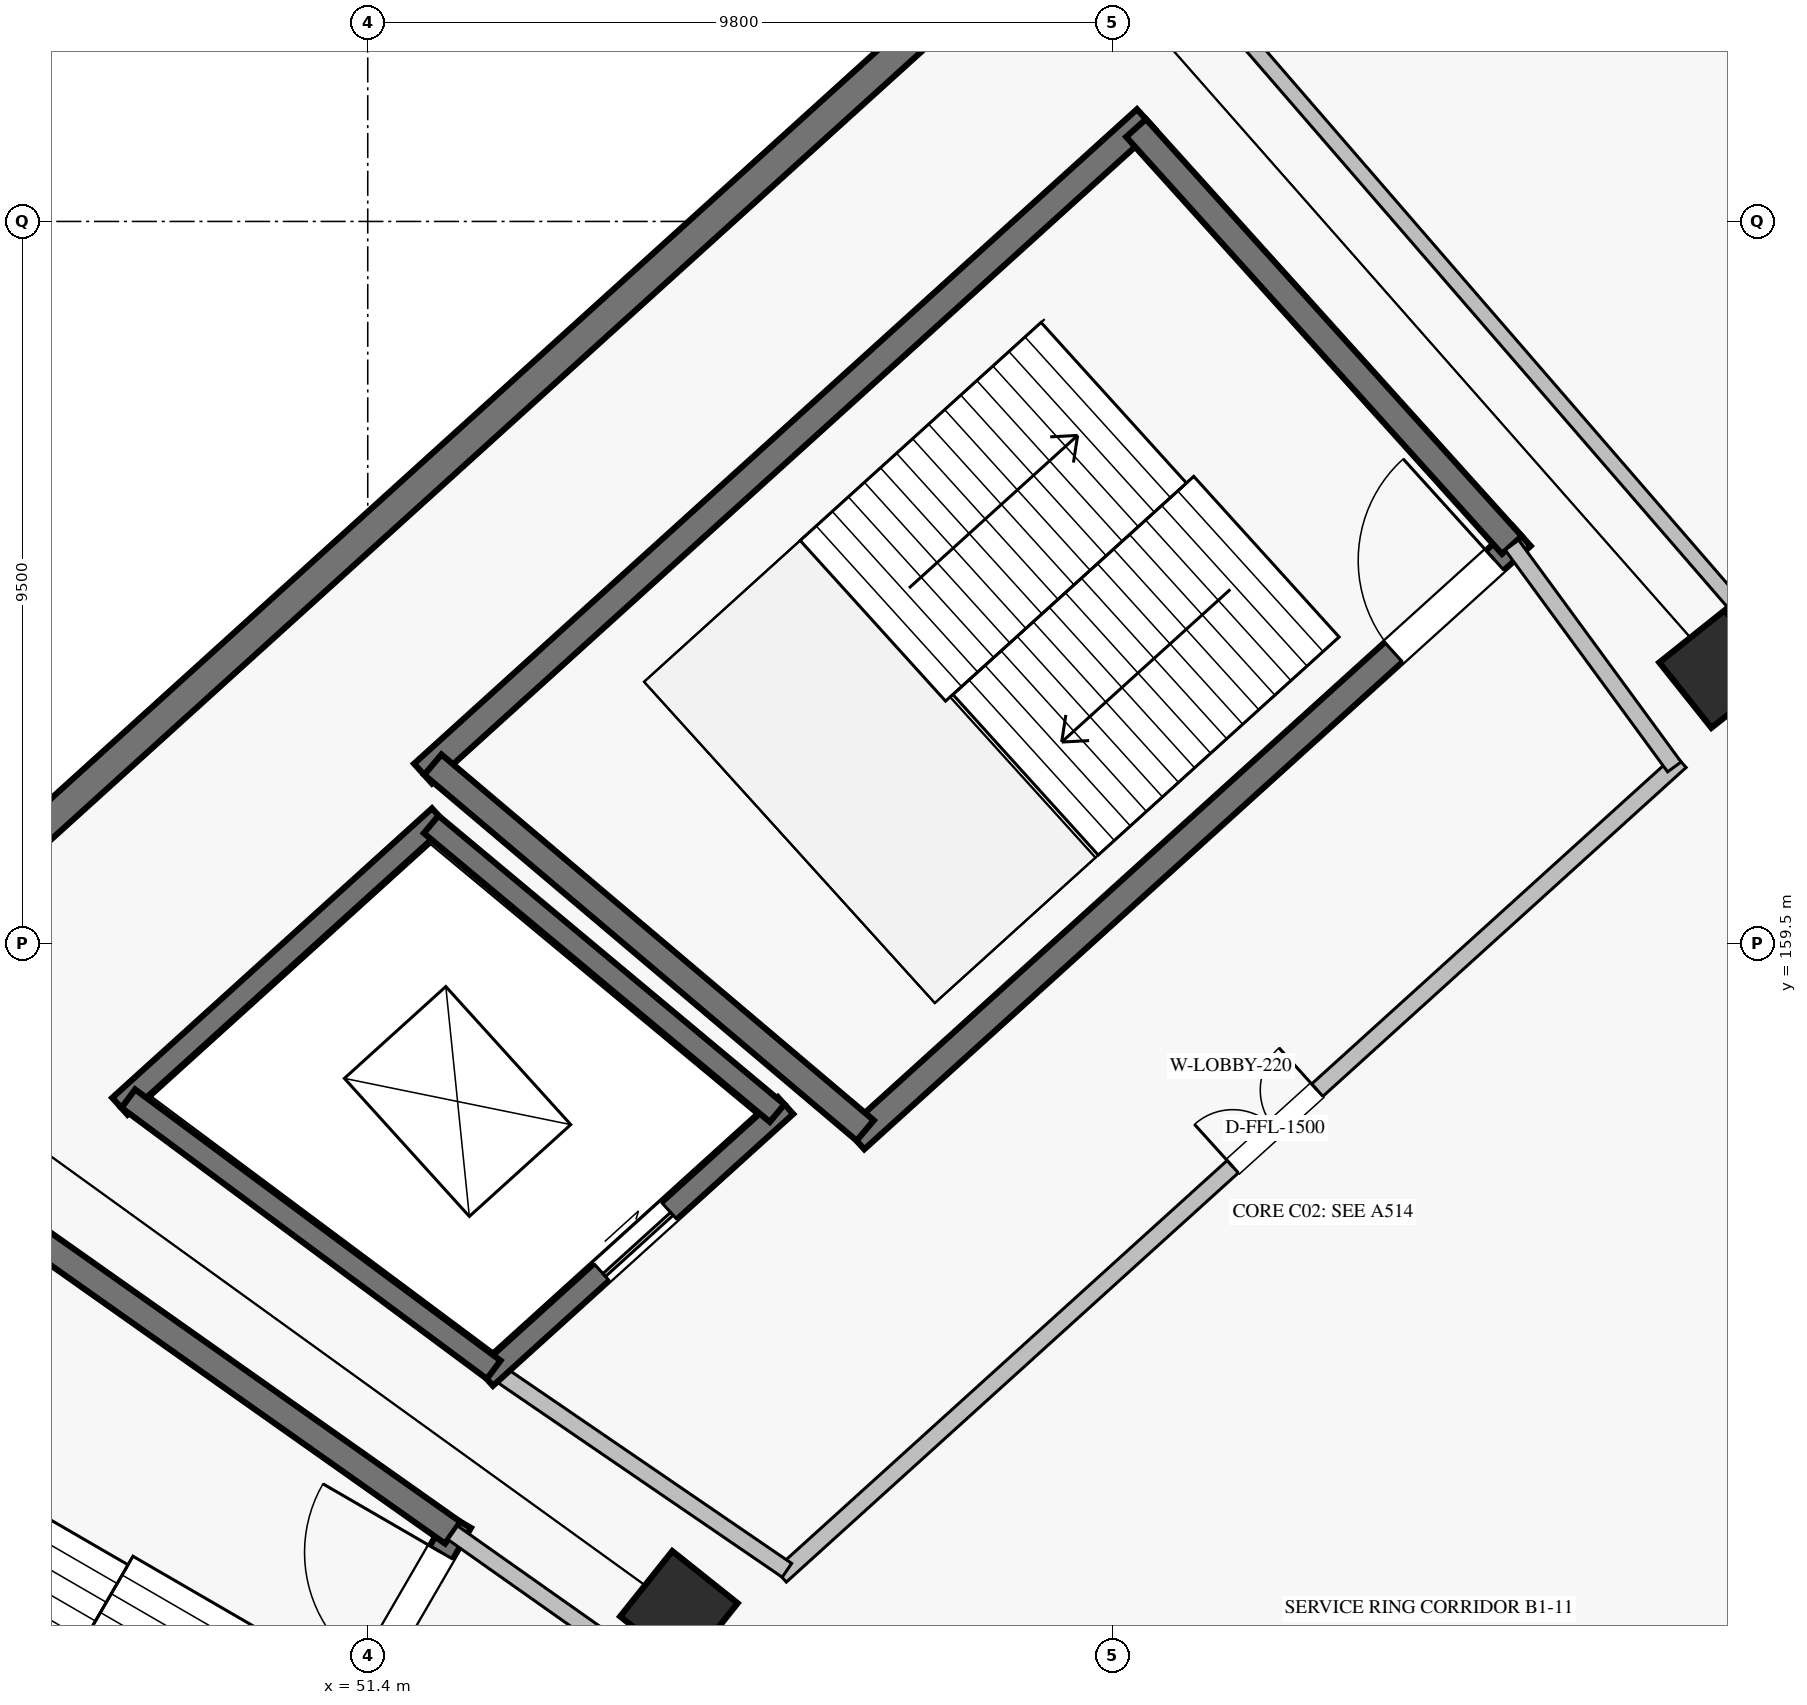
"""IFC4 building model, lengths in metres.
Left out: names, types, materials, properties, quantities, classifications, styles, units other than length and angle.
Written with IfcOpenShell. Run it as: python <this file> out.ifc"""

import sys

from ifc_helpers import new_model, si_unit, direction, frame, frame_2d, origin, origin_2d, place, context, subcontext, project, spatial, rectangle, extrude, element, fill, save


model = new_model("IFC4")
c1 = context("Model", 3, precision=1e-05, world=origin(), true_north=direction((0.0, 1.0)))
c2 = subcontext(c1, "Body", "Model", "MODEL_VIEW")
j1 = project(units=[si_unit("LENGTHUNIT", "METRE"), si_unit("PLANEANGLEUNIT", "RADIAN")], contexts=[c1])
p1 = place(None, origin())
s1 = spatial("IfcSite", under=j1, at=p1, CompositionType="ELEMENT")
p2 = place(p1, origin())
s2 = spatial("IfcBuilding", under=s1, at=p2, CompositionType="ELEMENT")
p3 = place(p2, frame((0.0, 0.0, -5.44)))
s3 = spatial("IfcBuildingStorey", under=s2, at=p3, CompositionType="ELEMENT", Elevation=-5.44)
for number, where, z_axis, x_axis in (
    (1, (69.166, 163.111, 0.0), (0.0, 0.0, 1.0), (-0.623, 0.782, 0.0)),
    (2, (55.494, 150.734, 0.0), (0.0, 0.0, 1.0), (-0.782, 0.623, 0.0)),
):
    element("IfcColumn", number, at=place(p3, frame(where, z_axis=z_axis, x_axis=x_axis)), inside=s3, PredefinedType="COLUMN", context=c2, shape_type="SweptSolid", body=[
        extrude(rectangle(XDim=1.1, YDim=1.1, at=origin_2d()), origin(), (0.0, 0.0, 1.0), 5.44),
    ])
p4 = place(p3, frame((60.113, 172.797, 0.0), z_axis=(0.0, 0.0, 1.0), x_axis=(-0.741354093053, -0.671114080253, 0.0)))
e3 = element("IfcWall", 3, at=p4, inside=s3, PredefinedType="SOLIDWALL", context=c2, shape_type="SweptSolid", body=[
    extrude(rectangle(XDim=20.664, YDim=0.4, at=frame_2d((10.332, 0.0))), origin(), (0.0, 0.0, 1.0), 4.42),
])
p5 = place(p3, frame((66.583, 164.86, 0.0), z_axis=(0.0, 0.0, 1.0), x_axis=(-0.741348929385, -0.671119784315, 0.0)))
e4 = element("IfcWall", 4, at=p5, inside=s3, PredefinedType="SHEAR", context=c2, shape_type="SweptSolid", body=[
    extrude(rectangle(XDim=11.826, YDim=0.35, at=frame_2d((5.913, 0.0))), origin(), (0.0, 0.0, 1.0), 5.14),
])
p6 = place(p5, frame((0.475, 0.0, 0.0)))
e5 = element("IfcOpeningElement", 5, at=p6, cuts=e4, PredefinedType="OPENING", context=c2, shape_type="SweptSolid", body=[
    extrude(rectangle(XDim=1.8, YDim=2.2, at=frame_2d((0.9, 1.1))), frame((0.0, 0.185, 0.0), z_axis=(0.0, -1.0, 0.0), x_axis=(1.0, 0.0, 0.0)), (0.0, 0.0, 1.0), 0.37),
])
p7 = place(p3, frame((61.639, 170.347, 0.0), z_axis=(0.0, 0.0, 1.0), x_axis=(-0.741351373721, -0.671117084183, 0.0)))
e6 = element("IfcWall", 6, at=p7, inside=s3, PredefinedType="SHEAR", context=c2, shape_type="SweptSolid", body=[
    extrude(rectangle(XDim=12.83, YDim=0.35, at=frame_2d((6.415, 0.0))), origin(), (0.0, 0.0, 1.0), 5.14),
])
p8 = place(p3, frame((66.454, 164.743, 0.0), z_axis=(0.0, 0.0, 1.0), x_axis=(-0.669463145673, 0.742845270958, 0.0)))
e7 = element("IfcWall", 7, at=p8, inside=s3, PredefinedType="SHEAR", context=c2, shape_type="SweptSolid", body=[
    extrude(rectangle(XDim=7.386, YDim=0.35, at=frame_2d((3.693, 0.0))), origin(), (0.0, 0.0, 1.0), 5.14),
])
p9 = place(p3, frame((57.945, 157.041, 0.0), z_axis=(0.0, 0.0, 1.0), x_axis=(-0.763422324031, 0.64589964791, 0.0)))
e8 = element("IfcWall", 8, at=p9, inside=s3, PredefinedType="SHEAR", context=c2, shape_type="SweptSolid", body=[
    extrude(rectangle(XDim=7.452, YDim=0.35, at=frame_2d((3.726, 0.0))), origin(), (0.0, 0.0, 1.0), 5.14),
])
p10 = place(p3, frame((56.897, 157.369, 0.0), z_axis=(0.0, 0.0, 1.0), x_axis=(-0.741350155641, -0.671118429736, 0.0)))
e9 = element("IfcWall", 9, at=p10, inside=s3, PredefinedType="SHEAR", context=c2, shape_type="SweptSolid", body=[
    extrude(rectangle(XDim=5.329, YDim=0.3, at=frame_2d((2.665, 0.0))), origin(), (0.0, 0.0, 1.0), 5.14),
])
p11 = place(p10, frame((2.065, 0.0, 0.0)))
e10 = element("IfcOpeningElement", 10, at=p11, cuts=e9, PredefinedType="OPENING", context=c2, shape_type="SweptSolid", body=[
    extrude(rectangle(XDim=1.2, YDim=2.2, at=frame_2d((0.6, 1.1))), frame((0.0, 0.16, 0.0), z_axis=(0.0, -1.0, 0.0), x_axis=(1.0, 0.0, 0.0)), (0.0, 0.0, 1.0), 0.32),
])
p12 = place(p3, frame((52.346, 161.168, 0.0), z_axis=(0.0, 0.0, 1.0), x_axis=(-0.74134208775, -0.671127341815, 0.0)))
e11 = element("IfcWall", 11, at=p12, inside=s3, PredefinedType="SHEAR", context=c2, shape_type="SweptSolid", body=[
    extrude(rectangle(XDim=5.675, YDim=0.3, at=frame_2d((2.837, 0.0))), origin(), (0.0, 0.0, 1.0), 5.14),
])
p13 = place(p3, frame((56.786, 157.268, 0.0), z_axis=(0.0, 0.0, 1.0), x_axis=(-0.767711354146, 0.640795815151, 0.0)))
e12 = element("IfcWall", 12, at=p13, inside=s3, PredefinedType="SHEAR", context=c2, shape_type="SweptSolid", body=[
    extrude(rectangle(XDim=5.929, YDim=0.3, at=frame_2d((2.964, 0.0))), origin(), (0.0, 0.0, 1.0), 5.14),
])
p14 = place(p3, frame((53.058, 153.893, 0.0), z_axis=(0.0, 0.0, 1.0), x_axis=(-0.803101805449, 0.59584183311, 0.0)))
e13 = element("IfcWall", 13, at=p14, inside=s3, PredefinedType="SHEAR", context=c2, shape_type="SweptSolid", body=[
    extrude(rectangle(XDim=5.986, YDim=0.3, at=frame_2d((2.993, 0.0))), origin(), (0.0, 0.0, 1.0), 5.14),
])
p15 = place(p3, frame((68.673, 161.898, 0.0), z_axis=(0.0, 0.0, 1.0), x_axis=(-0.741351035574, -0.671117457717, 0.0)))
e14 = element("IfcWall", 14, at=p15, inside=s3, PredefinedType="SOLIDWALL", context=c2, shape_type="SweptSolid", body=[
    extrude(rectangle(XDim=15.969, YDim=0.22, at=frame_2d((7.985, 0.0))), origin(), (0.0, 0.0, 1.0), 5.14),
])
p16 = place(p15, frame((6.447, 0.0, 0.0)))
e15 = element("IfcOpeningElement", 15, at=p16, cuts=e14, PredefinedType="OPENING", context=c2, shape_type="SweptSolid", body=[
    extrude(rectangle(XDim=1.5, YDim=2.2, at=frame_2d((0.75, 1.1))), frame((0.0, 0.12, 0.0), z_axis=(0.0, -1.0, 0.0), x_axis=(1.0, 0.0, 0.0)), (0.0, 0.0, 1.0), 0.24),
])
p17 = place(p3, frame((68.591, 161.824, 0.0), z_axis=(0.0, 0.0, 1.0), x_axis=(-0.590836915359, 0.806791013491, 0.0)))
e16 = element("IfcWall", 16, at=p17, inside=s3, PredefinedType="SOLIDWALL", context=c2, shape_type="SweptSolid", body=[
    extrude(rectangle(XDim=3.618, YDim=0.22, at=frame_2d((1.809, 0.0))), origin(), (0.0, 0.0, 1.0), 5.14),
])
p18 = place(p3, frame((56.915, 151.254, 0.0), z_axis=(0.0, 0.0, 1.0), x_axis=(-0.825385410642, 0.564569680287, 0.0)))
e17 = element("IfcWall", 17, at=p18, inside=s3, PredefinedType="SOLIDWALL", context=c2, shape_type="SweptSolid", body=[
    extrude(rectangle(XDim=4.674, YDim=0.22, at=frame_2d((2.337, 0.0))), origin(), (0.0, 0.0, 1.0), 5.14),
])
p19 = place(p3, frame((52.606, 151.9, 0.0), z_axis=(0.0, 0.0, 1.0), x_axis=(-0.501587404838, -0.865106973332, 0.0)))
e18 = element("IfcWall", 18, at=p19, inside=s3, PredefinedType="SHEAR", context=c2, shape_type="SweptSolid", body=[
    extrude(rectangle(XDim=11.435, YDim=0.35, at=frame_2d((5.718, 0.0))), origin(), (0.0, 0.0, 1.0), 5.14),
])
p20 = place(p19, frame((0.475, 0.0, 0.0)))
e19 = element("IfcOpeningElement", 19, at=p20, cuts=e18, PredefinedType="OPENING", context=c2, shape_type="SweptSolid", body=[
    extrude(rectangle(XDim=1.8, YDim=2.2, at=frame_2d((0.9, 1.1))), frame((0.0, 0.185, 0.0), z_axis=(0.0, -1.0, 0.0), x_axis=(1.0, 0.0, 0.0)), (0.0, 0.0, 1.0), 0.37),
])
p21 = place(p3, frame((52.519, 151.748, 0.0), z_axis=(0.0, 0.0, 1.0), x_axis=(-0.816983109824, 0.576661597701, 0.0)))
e20 = element("IfcWall", 20, at=p21, inside=s3, PredefinedType="SHEAR", context=c2, shape_type="SweptSolid", body=[
    extrude(rectangle(XDim=7.544, YDim=0.35, at=frame_2d((3.772, 0.0))), origin(), (0.0, 0.0, 1.0), 5.14),
])
p22 = place(p3, frame((54.889, 150.075, 0.0), z_axis=(0.0, 0.0, 1.0), x_axis=(-0.816984187086, 0.57666007149, 0.0)))
e21 = element("IfcWall", 21, at=p22, inside=s3, PredefinedType="SOLIDWALL", context=c2, shape_type="SweptSolid", body=[
    extrude(rectangle(XDim=2.901, YDim=0.22, at=frame_2d((1.451, 0.0))), origin(), (0.0, 0.0, 1.0), 5.14),
])
p23 = place(p3, frame((69.599, 163.72, 0.0), z_axis=(0.0, 0.0, 1.0), x_axis=(-0.654293035882, 0.756241114458, 0.0)))
e22 = element("IfcWall", 22, at=p23, inside=s3, PredefinedType="PARTITIONING", context=c2, shape_type="SweptSolid", body=[
    extrude(rectangle(XDim=12.091, YDim=0.2, at=frame_2d((6.045, 0.0))), origin(), (0.0, 0.0, 1.0), 4.46),
])
p24 = place(p6, frame((1.8, 0.0, 0.0), z_axis=(0.0, 0.0, 1.0), x_axis=(-1.0, 0.0, 0.0)))
e23 = element("IfcDoor", 23, at=p24, inside=s3, OperationType="SINGLE_SWING_RIGHT", PredefinedType="DOOR", context=c2, shape_type="SweptSolid", body=[
    extrude(rectangle(XDim=1.8, YDim=2.2, at=frame_2d((0.9, 1.1))), frame((0.0, 0.025, 0.0), z_axis=(0.0, -1.0, 0.0), x_axis=(1.0, 0.0, 0.0)), (0.0, 0.0, 1.0), 0.05),
])
fill(e5, e23)
p25 = place(p11, origin())
e24 = element("IfcDoor", 24, at=p25, inside=s3, OperationType="SLIDING_TO_LEFT", PredefinedType="DOOR", context=c2, shape_type="SweptSolid", body=[
    extrude(rectangle(XDim=1.2, YDim=2.2, at=frame_2d((0.6, 1.1))), frame((0.0, 0.025, 0.0), z_axis=(0.0, -1.0, 0.0), x_axis=(1.0, 0.0, 0.0)), (0.0, 0.0, 1.0), 0.05),
])
fill(e10, e24)
p26 = place(p16, frame((1.5, 0.0, 0.0), z_axis=(0.0, 0.0, 1.0), x_axis=(-1.0, 0.0, 0.0)))
e25 = element("IfcDoor", 25, at=p26, inside=s3, OperationType="DOUBLE_DOOR_SINGLE_SWING", PredefinedType="DOOR", context=c2, shape_type="SweptSolid", body=[
    extrude(rectangle(XDim=1.5, YDim=2.2, at=frame_2d((0.75, 1.1))), frame((0.0, 0.025, 0.0), z_axis=(0.0, -1.0, 0.0), x_axis=(1.0, 0.0, 0.0)), (0.0, 0.0, 1.0), 0.05),
])
fill(e15, e25)
p27 = place(p20, frame((1.8, 0.0, 0.0), z_axis=(0.0, 0.0, 1.0), x_axis=(-1.0, 0.0, 0.0)))
e26 = element("IfcDoor", 26, at=p27, inside=s3, OperationType="SINGLE_SWING_RIGHT", PredefinedType="DOOR", context=c2, shape_type="SweptSolid", body=[
    extrude(rectangle(XDim=1.8, YDim=2.2, at=frame_2d((0.9, 1.1))), frame((0.0, 0.025, 0.0), z_axis=(0.0, -1.0, 0.0), x_axis=(1.0, 0.0, 0.0)), (0.0, 0.0, 1.0), 0.05),
])
fill(e19, e26)
save(model, sys.argv[1])
